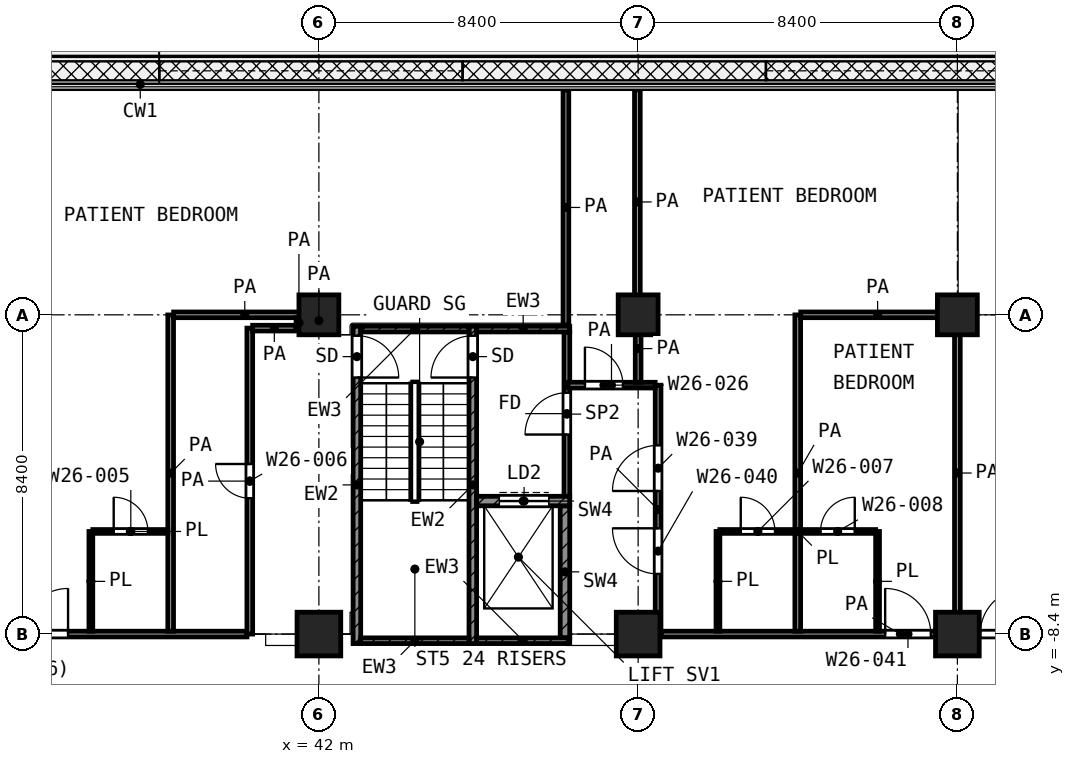
"""IFC4 building model, lengths in metres.
Left out: names, types, materials, properties, quantities, classifications, styles, units other than length and angle.
Written with IfcOpenShell. Run it as: python <this file> out.ifc"""

import sys

from ifc_helpers import new_model, si_unit, direction, frame, frame_2d, origin, origin_2d, place, context, subcontext, project, spatial, rectangle, extrude, element, fill, save


model = new_model("IFC4")
c1 = context("Model", 3, precision=1e-05, world=origin(), true_north=direction((0.0, 1.0)))
c2 = subcontext(c1, "Body", "Model", "MODEL_VIEW")
j1 = project(units=[si_unit("LENGTHUNIT", "METRE"), si_unit("PLANEANGLEUNIT", "RADIAN")], contexts=[c1])
p1 = place(None, origin())
s1 = spatial("IfcSite", under=j1, at=p1, CompositionType="ELEMENT")
p2 = place(p1, origin())
s2 = spatial("IfcBuilding", under=s1, at=p2, CompositionType="ELEMENT")
p3 = place(p2, frame((0.0, 0.0, 115.6)))
s3 = spatial("IfcBuildingStorey", under=s2, at=p3, CompositionType="ELEMENT", Elevation=115.6)
for number, where, z_axis, x_axis in (
    (1, (42.0, 0.0, 0.0), (0.0, 0.0, 1.0), (1.0, 0.0, 0.0)),
    (2, (50.4, 0.0, 0.0), (0.0, 0.0, 1.0), (1.0, 0.0, 0.0)),
    (3, (58.8, 0.0, 0.0), (0.0, 0.0, 1.0), (1.0, 0.0, 0.0)),
):
    element("IfcColumn", number, at=place(p3, frame(where, z_axis=z_axis, x_axis=x_axis)), inside=s3, PredefinedType="COLUMN", context=c2, shape_type="SweptSolid", body=[
        extrude(rectangle(XDim=1.05, YDim=1.05, at=origin_2d()), origin(), (0.0, 0.0, 1.0), 4.2),
    ])
for number, where, z_axis, x_axis in (
    (4, (42.0, -8.4, 0.0), (0.0, 0.0, 1.0), (1.0, 0.0, 0.0)),
    (5, (50.4, -8.4, 0.0), (0.0, 0.0, 1.0), (1.0, 0.0, 0.0)),
    (6, (58.8, -8.4, 0.0), (0.0, 0.0, 1.0), (1.0, 0.0, 0.0)),
):
    element("IfcColumn", number, at=place(p3, frame(where, z_axis=z_axis, x_axis=x_axis)), inside=s3, PredefinedType="COLUMN", context=c2, shape_type="SweptSolid", body=[
        extrude(rectangle(XDim=1.15, YDim=1.15, at=origin_2d()), origin(), (0.0, 0.0, 1.0), 4.2),
    ])
p4 = place(p3, frame((43.0, -8.65, 0.0), z_axis=(0.0, 0.0, 1.0), x_axis=(0.0, 1.0, 0.0)))
e7 = element("IfcWall", 7, at=p4, inside=s3, PredefinedType="SHEAR", context=c2, shape_type="SweptSolid", body=[
    extrude(rectangle(XDim=8.35, YDim=0.2, at=frame_2d((4.175, 0.0))), origin(), (0.0, 0.0, 1.0), 3.6),
])
p5 = place(p4, frame((7.0, 0.0, 0.0)))
e8 = element("IfcOpeningElement", 8, at=p5, cuts=e7, PredefinedType="OPENING", context=c2, shape_type="SweptSolid", body=[
    extrude(rectangle(XDim=1.1, YDim=2.1, at=frame_2d((0.55, 1.05))), frame((0.0, 0.11, 0.0), z_axis=(0.0, -1.0, 0.0), x_axis=(1.0, 0.0, 0.0)), (0.0, 0.0, 1.0), 0.22),
])
p6 = place(p3, frame((46.05, -8.65, 0.0), z_axis=(0.0, 0.0, 1.0), x_axis=(0.0, 1.0, 0.0)))
e9 = element("IfcWall", 9, at=p6, inside=s3, PredefinedType="SHEAR", context=c2, shape_type="SweptSolid", body=[
    extrude(rectangle(XDim=8.35, YDim=0.2, at=frame_2d((4.175, 0.0))), origin(), (0.0, 0.0, 1.0), 3.6),
])
p7 = place(p6, frame((7.0, 0.0, 0.0)))
e10 = element("IfcOpeningElement", 10, at=p7, cuts=e9, PredefinedType="OPENING", context=c2, shape_type="SweptSolid", body=[
    extrude(rectangle(XDim=1.1, YDim=2.1, at=frame_2d((0.55, 1.05))), frame((0.0, 0.11, 0.0), z_axis=(0.0, -1.0, 0.0), x_axis=(1.0, 0.0, 0.0)), (0.0, 0.0, 1.0), 0.22),
])
p8 = place(p3, frame((43.1, -0.375, 0.0), z_axis=(0.0, 0.0, 1.0), x_axis=(1.0, 0.0, 0.0)))
e11 = element("IfcWall", 11, at=p8, inside=s3, PredefinedType="SHEAR", context=c2, shape_type="SweptSolid", body=[
    extrude(rectangle(XDim=2.85, YDim=0.15, at=frame_2d((1.425, 0.0))), origin(), (0.0, 0.0, 1.0), 3.6),
])
p9 = place(p3, frame((46.15, -0.375, 0.0), z_axis=(0.0, 0.0, 1.0), x_axis=(1.0, 0.0, 0.0)))
e12 = element("IfcWall", 12, at=p9, inside=s3, PredefinedType="SHEAR", context=c2, shape_type="SweptSolid", body=[
    extrude(rectangle(XDim=2.45, YDim=0.15, at=frame_2d((1.225, 0.0))), origin(), (0.0, 0.0, 1.0), 3.6),
])
p10 = place(p3, frame((43.1, -8.575, 0.0), z_axis=(0.0, 0.0, 1.0), x_axis=(1.0, 0.0, 0.0)))
e13 = element("IfcWall", 13, at=p10, inside=s3, PredefinedType="SHEAR", context=c2, shape_type="SweptSolid", body=[
    extrude(rectangle(XDim=2.85, YDim=0.15, at=frame_2d((1.425, 0.0))), origin(), (0.0, 0.0, 1.0), 3.6),
])
p11 = place(p3, frame((46.15, -8.575, 0.0), z_axis=(0.0, 0.0, 1.0), x_axis=(1.0, 0.0, 0.0)))
e14 = element("IfcWall", 14, at=p11, inside=s3, PredefinedType="SHEAR", context=c2, shape_type="SweptSolid", body=[
    extrude(rectangle(XDim=2.45, YDim=0.15, at=frame_2d((1.225, 0.0))), origin(), (0.0, 0.0, 1.0), 3.6),
])
p12 = place(p3, frame((46.15, -4.9, 0.0), z_axis=(0.0, 0.0, 1.0), x_axis=(1.0, 0.0, 0.0)))
e15 = element("IfcWall", 15, at=p12, inside=s3, PredefinedType="SHEAR", context=c2, shape_type="SweptSolid", body=[
    extrude(rectangle(XDim=2.45, YDim=0.25, at=frame_2d((1.225, 0.0))), origin(), (0.0, 0.0, 1.0), 3.6),
])
p13 = place(p12, frame((0.6, 0.0, 0.0)))
e16 = element("IfcOpeningElement", 16, at=p13, cuts=e15, PredefinedType="OPENING", context=c2, shape_type="SweptSolid", body=[
    extrude(rectangle(XDim=1.3, YDim=2.1, at=frame_2d((0.65, 1.05))), frame((0.0, 0.135, 0.0), z_axis=(0.0, -1.0, 0.0), x_axis=(1.0, 0.0, 0.0)), (0.0, 0.0, 1.0), 0.27),
])
p14 = place(p3, frame((48.475, -8.5, 0.0), z_axis=(0.0, 0.0, 1.0), x_axis=(0.0, 1.0, 0.0)))
e17 = element("IfcWall", 17, at=p14, inside=s3, PredefinedType="SHEAR", context=c2, shape_type="SweptSolid", body=[
    extrude(rectangle(XDim=3.475, YDim=0.25, at=frame_2d((1.738, 0.0))), origin(), (0.0, 0.0, 1.0), 3.6),
])
p15 = place(p3, frame((48.525, -4.775, 0.0), z_axis=(0.0, 0.0, 1.0), x_axis=(0.0, 1.0, 0.0)))
e18 = element("IfcWall", 18, at=p15, inside=s3, PredefinedType="PARTITIONING", context=c2, shape_type="SweptSolid", body=[
    extrude(rectangle(XDim=4.325, YDim=0.15, at=frame_2d((2.163, 0.0))), origin(), (0.0, 0.0, 1.0), 3.6),
])
p16 = place(p15, frame((1.625, 0.0, 0.0)))
e19 = element("IfcOpeningElement", 19, at=p16, cuts=e18, PredefinedType="OPENING", context=c2, shape_type="SweptSolid", body=[
    extrude(rectangle(XDim=1.1, YDim=2.1, at=frame_2d((0.55, 1.05))), frame((0.0, 0.085, 0.0), z_axis=(0.0, -1.0, 0.0), x_axis=(1.0, 0.0, 0.0)), (0.0, 0.0, 1.0), 0.17),
])
p17 = place(p3, frame((36.052, -5.7, 0.0), z_axis=(0.0, 0.0, 1.0), x_axis=(1.0, 0.0, 0.0)))
e20 = element("IfcWall", 20, at=p17, inside=s3, PredefinedType="PARTITIONING", context=c2, shape_type="SweptSolid", body=[
    extrude(rectangle(XDim=1.973, YDim=0.1, at=frame_2d((0.986, 0.0))), origin(), (0.0, 0.0, 1.0), 3.6),
])
p18 = place(p17, frame((0.549, 0.0, 0.0)))
e21 = element("IfcOpeningElement", 21, at=p18, cuts=e20, PredefinedType="OPENING", context=c2, shape_type="SweptSolid", body=[
    extrude(rectangle(XDim=0.9, YDim=2.1, at=frame_2d((0.45, 1.05))), frame((0.0, 0.06, 0.0), z_axis=(0.0, -1.0, 0.0), x_axis=(1.0, 0.0, 0.0)), (0.0, 0.0, 1.0), 0.12),
])
p19 = place(p3, frame((52.55, -5.7, 0.0), z_axis=(0.0, 0.0, 1.0), x_axis=(1.0, 0.0, 0.0)))
e22 = element("IfcWall", 22, at=p19, inside=s3, PredefinedType="PARTITIONING", context=c2, shape_type="SweptSolid", body=[
    extrude(rectangle(XDim=4.1, YDim=0.1, at=frame_2d((2.05, 0.0))), origin(), (0.0, 0.0, 1.0), 3.6),
])
p20 = place(p19, frame((0.55, 0.0, 0.0)))
e23 = element("IfcOpeningElement", 23, at=p20, cuts=e22, PredefinedType="OPENING", context=c2, shape_type="SweptSolid", body=[
    extrude(rectangle(XDim=0.9, YDim=2.1, at=frame_2d((0.45, 1.05))), frame((0.0, 0.06, 0.0), z_axis=(0.0, -1.0, 0.0), x_axis=(1.0, 0.0, 0.0)), (0.0, 0.0, 1.0), 0.12),
])
p21 = place(p19, frame((2.65, 0.0, 0.0)))
e24 = element("IfcOpeningElement", 24, at=p21, cuts=e22, PredefinedType="OPENING", context=c2, shape_type="SweptSolid", body=[
    extrude(rectangle(XDim=0.9, YDim=2.1, at=frame_2d((0.45, 1.05))), frame((0.0, 0.06, 0.0), z_axis=(0.0, -1.0, 0.0), x_axis=(1.0, 0.0, 0.0)), (0.0, 0.0, 1.0), 0.12),
])
p22 = place(p3, frame((36.0, -8.325, 0.0), z_axis=(0.0, 0.0, 1.0), x_axis=(0.0, 1.0, 0.0)))
e25 = element("IfcWall", 25, at=p22, inside=s3, PredefinedType="PARTITIONING", context=c2, shape_type="SweptSolid", body=[
    extrude(rectangle(XDim=2.624, YDim=0.1, at=frame_2d((1.312, 0.0))), origin(), (0.0, 0.0, 1.0), 3.6),
])
for number, where, z_axis, x_axis in (
    (26, (52.5, -8.325, 0.0), (0.0, 0.0, 1.0), (0.0, 1.0, 0.0)),
    (27, (56.7, -8.325, 0.0), (0.0, 0.0, 1.0), (0.0, 1.0, 0.0)),
):
    element("IfcWall", number, at=place(p3, frame(where, z_axis=z_axis, x_axis=x_axis)), inside=s3, PredefinedType="PARTITIONING", context=c2, shape_type="SweptSolid", body=[
        extrude(rectangle(XDim=2.625, YDim=0.1, at=frame_2d((1.312, 0.0))), origin(), (0.0, 0.0, 1.0), 3.6),
    ])
p23 = place(p3, frame((25.0, -8.4, 0.0), z_axis=(0.0, 0.0, 1.0), x_axis=(1.0, 0.0, 0.0)))
e28 = element("IfcWall", 28, at=p23, inside=s3, PredefinedType="PARTITIONING", context=c2, shape_type="SweptSolid", body=[
    extrude(rectangle(XDim=15.107, YDim=0.15, at=frame_2d((7.553, 0.0))), origin(), (0.0, 0.0, 1.0), 3.6),
])
p24 = place(p23, frame((3.65, 0.0, 0.0)))
e29 = element("IfcOpeningElement", 29, at=p24, cuts=e28, PredefinedType="OPENING", context=c2, shape_type="SweptSolid", body=[
    extrude(rectangle(XDim=1.5, YDim=2.1, at=frame_2d((0.75, 1.05))), frame((0.0, 0.085, 0.0), z_axis=(0.0, -1.0, 0.0), x_axis=(1.0, 0.0, 0.0)), (0.0, 0.0, 1.0), 0.17),
])
p25 = place(p23, frame((9.2, 0.0, 0.0)))
e30 = element("IfcOpeningElement", 30, at=p25, cuts=e28, PredefinedType="OPENING", context=c2, shape_type="SweptSolid", body=[
    extrude(rectangle(XDim=1.2, YDim=2.1, at=frame_2d((0.6, 1.05))), frame((0.0, 0.085, 0.0), z_axis=(0.0, -1.0, 0.0), x_axis=(1.0, 0.0, 0.0)), (0.0, 0.0, 1.0), 0.17),
])
p26 = place(p3, frame((51.0, -8.4, 0.0), z_axis=(0.0, 0.0, 1.0), x_axis=(1.0, 0.0, 0.0)))
e31 = element("IfcWall", 31, at=p26, inside=s3, PredefinedType="PARTITIONING", context=c2, shape_type="SweptSolid", body=[
    extrude(rectangle(XDim=12.6, YDim=0.15, at=frame_2d((6.3, 0.0))), origin(), (0.0, 0.0, 1.0), 3.6),
])
p27 = place(p26, frame((5.9, 0.0, 0.0)))
e32 = element("IfcOpeningElement", 32, at=p27, cuts=e31, PredefinedType="OPENING", context=c2, shape_type="SweptSolid", body=[
    extrude(rectangle(XDim=1.2, YDim=2.1, at=frame_2d((0.6, 1.05))), frame((0.0, 0.085, 0.0), z_axis=(0.0, -1.0, 0.0), x_axis=(1.0, 0.0, 0.0)), (0.0, 0.0, 1.0), 0.17),
])
p28 = place(p26, frame((8.4, 0.0, 0.0)))
e33 = element("IfcOpeningElement", 33, at=p28, cuts=e31, PredefinedType="OPENING", context=c2, shape_type="SweptSolid", body=[
    extrude(rectangle(XDim=1.2, YDim=2.1, at=frame_2d((0.6, 1.05))), frame((0.0, 0.085, 0.0), z_axis=(0.0, -1.0, 0.0), x_axis=(1.0, 0.0, 0.0)), (0.0, 0.0, 1.0), 0.17),
])
p29 = place(p3, frame((48.55, -1.85, 0.0), z_axis=(0.0, 0.0, 1.0), x_axis=(1.0, 0.0, 0.0)))
e34 = element("IfcWall", 34, at=p29, inside=s3, PredefinedType="PARTITIONING", context=c2, shape_type="SweptSolid", body=[
    extrude(rectangle(XDim=2.298, YDim=0.15, at=frame_2d((1.149, 0.0))), origin(), (0.0, 0.0, 1.0), 3.6),
])
p30 = place(p29, frame((0.45, 0.0, 0.0)))
e35 = element("IfcOpeningElement", 35, at=p30, cuts=e34, PredefinedType="OPENING", context=c2, shape_type="SweptSolid", body=[
    extrude(rectangle(XDim=1.0, YDim=2.1, at=frame_2d((0.5, 1.05))), frame((0.0, 0.085, 0.0), z_axis=(0.0, -1.0, 0.0), x_axis=(1.0, 0.0, 0.0)), (0.0, 0.0, 1.0), 0.17),
])
p31 = place(p3, frame((40.257, -0.35, 0.0), z_axis=(0.0, 0.0, 1.0), x_axis=(1.0, 0.0, 0.0)))
e36 = element("IfcWall", 36, at=p31, inside=s3, PredefinedType="PARTITIONING", context=c2, shape_type="SweptSolid", body=[
    extrude(rectangle(XDim=1.141, YDim=0.15, at=frame_2d((0.57, 0.0))), origin(), (0.0, 0.0, 1.0), 3.6),
])
p32 = place(p3, frame((38.178, 0.0, 0.0), z_axis=(0.0, 0.0, 1.0), x_axis=(1.0, 0.0, 0.0)))
e37 = element("IfcWall", 37, at=p32, inside=s3, PredefinedType="PARTITIONING", context=c2, shape_type="SweptSolid", body=[
    extrude(rectangle(XDim=3.744, YDim=0.15, at=frame_2d((1.872, 0.0))), origin(), (0.0, 0.0, 1.0), 3.6),
])
p33 = place(p3, frame((54.678, 0.0, 0.0), z_axis=(0.0, 0.0, 1.0), x_axis=(1.0, 0.0, 0.0)))
e38 = element("IfcWall", 38, at=p33, inside=s3, PredefinedType="PARTITIONING", context=c2, shape_type="SweptSolid", body=[
    extrude(rectangle(XDim=4.047, YDim=0.15, at=frame_2d((2.023, 0.0))), origin(), (0.0, 0.0, 1.0), 3.6),
])
p34 = place(p3, frame((38.1, -8.325, 0.0), z_axis=(0.0, 0.0, 1.0), x_axis=(0.0, 1.0, 0.0)))
e39 = element("IfcWall", 39, at=p34, inside=s3, PredefinedType="PARTITIONING", context=c2, shape_type="SweptSolid", body=[
    extrude(rectangle(XDim=8.322, YDim=0.15, at=frame_2d((4.161, 0.0))), origin(), (0.0, 0.0, 1.0), 3.6),
])
p35 = place(p3, frame((40.182, -8.4, 0.0), z_axis=(0.0, 0.0, 1.0), x_axis=(0.0, 1.0, 0.0)))
e40 = element("IfcWall", 40, at=p35, inside=s3, PredefinedType="PARTITIONING", context=c2, shape_type="SweptSolid", body=[
    extrude(rectangle(XDim=8.05, YDim=0.15, at=frame_2d((4.025, 0.0))), origin(), (0.0, 0.0, 1.0), 3.6),
])
p36 = place(p35, frame((3.575, 0.0, 0.0)))
e41 = element("IfcOpeningElement", 41, at=p36, cuts=e40, PredefinedType="OPENING", context=c2, shape_type="SweptSolid", body=[
    extrude(rectangle(XDim=0.9, YDim=2.1, at=frame_2d((0.45, 1.05))), frame((0.0, 0.085, 0.0), z_axis=(0.0, -1.0, 0.0), x_axis=(1.0, 0.0, 0.0)), (0.0, 0.0, 1.0), 0.17),
])
p37 = place(p3, frame((41.475, -0.348, 0.0), z_axis=(0.0, 0.0, 1.0), x_axis=(0.0, 1.0, 0.0)))
e42 = element("IfcWall", 42, at=p37, inside=s3, PredefinedType="PARTITIONING", context=c2, shape_type="SweptSolid", body=[
    extrude(rectangle(XDim=0.273, YDim=0.15, at=frame_2d((0.136, 0.0))), origin(), (0.0, 0.0, 1.0), 3.6),
])
p38 = place(p3, frame((42.0, -0.3, 0.0), z_axis=(0.0, 0.0, 1.0), x_axis=(0.0, 1.0, 0.0)))
e43 = element("IfcWall", 43, at=p38, inside=s3, PredefinedType="PARTITIONING", context=c2, shape_type="SweptSolid", body=[
    extrude(rectangle(XDim=0.297, YDim=0.15, at=frame_2d((0.148, 0.0))), origin(), (0.0, 0.0, 1.0), 3.6),
])
p39 = place(p3, frame((48.5, -0.27, 0.0), z_axis=(0.0, 0.0, 1.0), x_axis=(0.0, 1.0, 0.0)))
e44 = element("IfcWall", 44, at=p39, inside=s3, PredefinedType="PARTITIONING", context=c2, shape_type="SweptSolid", body=[
    extrude(rectangle(XDim=6.19, YDim=0.15, at=frame_2d((3.095, 0.0))), origin(), (0.0, 0.0, 1.0), 3.6),
])
p40 = place(p3, frame((50.38, 0.02, 0.0), z_axis=(0.0, 0.0, 1.0), x_axis=(0.0, 1.0, 0.0)))
e45 = element("IfcWall", 45, at=p40, inside=s3, PredefinedType="PARTITIONING", context=c2, shape_type="SweptSolid", body=[
    extrude(rectangle(XDim=5.9, YDim=0.15, at=frame_2d((2.95, 0.0))), origin(), (0.0, 0.0, 1.0), 3.6),
])
p41 = place(p3, frame((50.4, -1.775, 0.0), z_axis=(0.0, 0.0, 1.0), x_axis=(0.0, 1.0, 0.0)))
e46 = element("IfcWall", 46, at=p41, inside=s3, PredefinedType="PARTITIONING", context=c2, shape_type="SweptSolid", body=[
    extrude(rectangle(XDim=1.773, YDim=0.15, at=frame_2d((0.886, 0.0))), origin(), (0.0, 0.0, 1.0), 3.6),
])
p42 = place(p3, frame((50.925, -8.4, 0.0), z_axis=(0.0, 0.0, 1.0), x_axis=(0.0, 1.0, 0.0)))
e47 = element("IfcWall", 47, at=p42, inside=s3, PredefinedType="PARTITIONING", context=c2, shape_type="SweptSolid", body=[
    extrude(rectangle(XDim=6.548, YDim=0.15, at=frame_2d((3.274, 0.0))), origin(), (0.0, 0.0, 1.0), 3.6),
])
p43 = place(p42, frame((3.765, 0.0, 0.0)))
e48 = element("IfcOpeningElement", 48, at=p43, cuts=e47, PredefinedType="OPENING", context=c2, shape_type="SweptSolid", body=[
    extrude(rectangle(XDim=1.2, YDim=2.1, at=frame_2d((0.6, 1.05))), frame((0.0, 0.085, 0.0), z_axis=(0.0, -1.0, 0.0), x_axis=(1.0, 0.0, 0.0)), (0.0, 0.0, 1.0), 0.17),
])
p44 = place(p42, frame((1.583, 0.0, 0.0)))
e49 = element("IfcOpeningElement", 49, at=p44, cuts=e47, PredefinedType="OPENING", context=c2, shape_type="SweptSolid", body=[
    extrude(rectangle(XDim=1.2, YDim=2.1, at=frame_2d((0.6, 1.05))), frame((0.0, 0.085, 0.0), z_axis=(0.0, -1.0, 0.0), x_axis=(1.0, 0.0, 0.0)), (0.0, 0.0, 1.0), 0.17),
])
p45 = place(p3, frame((54.6, -8.325, 0.0), z_axis=(0.0, 0.0, 1.0), x_axis=(0.0, 1.0, 0.0)))
e50 = element("IfcWall", 50, at=p45, inside=s3, PredefinedType="PARTITIONING", context=c2, shape_type="SweptSolid", body=[
    extrude(rectangle(XDim=8.323, YDim=0.15, at=frame_2d((4.162, 0.0))), origin(), (0.0, 0.0, 1.0), 3.6),
])
p46 = place(p3, frame((58.8, -8.325, 0.0), z_axis=(0.0, 0.0, 1.0), x_axis=(0.0, 1.0, 0.0)))
e51 = element("IfcWall", 51, at=p46, inside=s3, PredefinedType="PARTITIONING", context=c2, shape_type="SweptSolid", body=[
    extrude(rectangle(XDim=8.325, YDim=0.15, at=frame_2d((4.163, 0.0))), origin(), (0.0, 0.0, 1.0), 3.6),
])
p47 = place(p5, frame((1.1, 0.0, 0.0), z_axis=(0.0, 0.0, 1.0), x_axis=(-1.0, 0.0, 0.0)))
e52 = element("IfcDoor", 52, at=p47, inside=s3, OperationType="SINGLE_SWING_LEFT", PredefinedType="DOOR", context=c2, shape_type="SweptSolid", body=[
    extrude(rectangle(XDim=1.1, YDim=2.1, at=frame_2d((0.55, 1.05))), frame((0.0, 0.025, 0.0), z_axis=(0.0, -1.0, 0.0), x_axis=(1.0, 0.0, 0.0)), (0.0, 0.0, 1.0), 0.05),
])
fill(e8, e52)
p48 = place(p7, origin())
e53 = element("IfcDoor", 53, at=p48, inside=s3, OperationType="SINGLE_SWING_LEFT", PredefinedType="DOOR", context=c2, shape_type="SweptSolid", body=[
    extrude(rectangle(XDim=1.1, YDim=2.1, at=frame_2d((0.55, 1.05))), frame((0.0, 0.025, 0.0), z_axis=(0.0, -1.0, 0.0), x_axis=(1.0, 0.0, 0.0)), (0.0, 0.0, 1.0), 0.05),
])
fill(e10, e53)
p49 = place(p13, origin())
e54 = element("IfcDoor", 54, at=p49, inside=s3, OperationType="DOUBLE_DOOR_SLIDING", PredefinedType="DOOR", context=c2, shape_type="SweptSolid", body=[
    extrude(rectangle(XDim=1.3, YDim=2.1, at=frame_2d((0.65, 1.05))), frame((0.0, 0.025, 0.0), z_axis=(0.0, -1.0, 0.0), x_axis=(1.0, 0.0, 0.0)), (0.0, 0.0, 1.0), 0.05),
])
fill(e16, e54)
p50 = place(p16, origin())
e55 = element("IfcDoor", 55, at=p50, inside=s3, OperationType="SINGLE_SWING_LEFT", PredefinedType="DOOR", context=c2, shape_type="SweptSolid", body=[
    extrude(rectangle(XDim=1.1, YDim=2.1, at=frame_2d((0.55, 1.05))), frame((0.0, 0.025, 0.0), z_axis=(0.0, -1.0, 0.0), x_axis=(1.0, 0.0, 0.0)), (0.0, 0.0, 1.0), 0.05),
])
fill(e19, e55)
p51 = place(p25, origin())
e56 = element("IfcDoor", 56, at=p51, inside=s3, OperationType="SINGLE_SWING_RIGHT", PredefinedType="DOOR", context=c2, shape_type="SweptSolid", body=[
    extrude(rectangle(XDim=1.2, YDim=2.1, at=frame_2d((0.6, 1.05))), frame((0.0, 0.025, 0.0), z_axis=(0.0, -1.0, 0.0), x_axis=(1.0, 0.0, 0.0)), (0.0, 0.0, 1.0), 0.05),
])
fill(e30, e56)
p52 = place(p18, origin())
e57 = element("IfcDoor", 57, at=p52, inside=s3, OperationType="SINGLE_SWING_LEFT", PredefinedType="DOOR", context=c2, shape_type="SweptSolid", body=[
    extrude(rectangle(XDim=0.9, YDim=2.1, at=frame_2d((0.45, 1.05))), frame((0.0, 0.025, 0.0), z_axis=(0.0, -1.0, 0.0), x_axis=(1.0, 0.0, 0.0)), (0.0, 0.0, 1.0), 0.05),
])
fill(e21, e57)
p53 = place(p36, origin())
e58 = element("IfcDoor", 58, at=p53, inside=s3, OperationType="SINGLE_SWING_RIGHT", PredefinedType="DOOR", context=c2, shape_type="SweptSolid", body=[
    extrude(rectangle(XDim=0.9, YDim=2.1, at=frame_2d((0.45, 1.05))), frame((0.0, 0.025, 0.0), z_axis=(0.0, -1.0, 0.0), x_axis=(1.0, 0.0, 0.0)), (0.0, 0.0, 1.0), 0.05),
])
fill(e41, e58)
p54 = place(p30, origin())
e59 = element("IfcDoor", 59, at=p54, inside=s3, OperationType="SINGLE_SWING_LEFT", PredefinedType="DOOR", context=c2, shape_type="SweptSolid", body=[
    extrude(rectangle(XDim=1.0, YDim=2.1, at=frame_2d((0.5, 1.05))), frame((0.0, 0.025, 0.0), z_axis=(0.0, -1.0, 0.0), x_axis=(1.0, 0.0, 0.0)), (0.0, 0.0, 1.0), 0.05),
])
fill(e35, e59)
p55 = place(p43, origin())
e60 = element("IfcDoor", 60, at=p55, inside=s3, OperationType="SINGLE_SWING_LEFT", PredefinedType="DOOR", context=c2, shape_type="SweptSolid", body=[
    extrude(rectangle(XDim=1.2, YDim=2.1, at=frame_2d((0.6, 1.05))), frame((0.0, 0.025, 0.0), z_axis=(0.0, -1.0, 0.0), x_axis=(1.0, 0.0, 0.0)), (0.0, 0.0, 1.0), 0.05),
])
fill(e48, e60)
p56 = place(p44, origin())
e61 = element("IfcDoor", 61, at=p56, inside=s3, OperationType="SINGLE_SWING_RIGHT", PredefinedType="DOOR", context=c2, shape_type="SweptSolid", body=[
    extrude(rectangle(XDim=1.2, YDim=2.1, at=frame_2d((0.6, 1.05))), frame((0.0, 0.025, 0.0), z_axis=(0.0, -1.0, 0.0), x_axis=(1.0, 0.0, 0.0)), (0.0, 0.0, 1.0), 0.05),
])
fill(e49, e61)
p57 = place(p20, origin())
e62 = element("IfcDoor", 62, at=p57, inside=s3, OperationType="SINGLE_SWING_LEFT", PredefinedType="DOOR", context=c2, shape_type="SweptSolid", body=[
    extrude(rectangle(XDim=0.9, YDim=2.1, at=frame_2d((0.45, 1.05))), frame((0.0, 0.025, 0.0), z_axis=(0.0, -1.0, 0.0), x_axis=(1.0, 0.0, 0.0)), (0.0, 0.0, 1.0), 0.05),
])
fill(e23, e62)
p58 = place(p27, origin())
e63 = element("IfcDoor", 63, at=p58, inside=s3, OperationType="SINGLE_SWING_LEFT", PredefinedType="DOOR", context=c2, shape_type="SweptSolid", body=[
    extrude(rectangle(XDim=1.2, YDim=2.1, at=frame_2d((0.6, 1.05))), frame((0.0, 0.025, 0.0), z_axis=(0.0, -1.0, 0.0), x_axis=(1.0, 0.0, 0.0)), (0.0, 0.0, 1.0), 0.05),
])
fill(e32, e63)
p59 = place(p21, origin())
e64 = element("IfcDoor", 64, at=p59, inside=s3, OperationType="SINGLE_SWING_RIGHT", PredefinedType="DOOR", context=c2, shape_type="SweptSolid", body=[
    extrude(rectangle(XDim=0.9, YDim=2.1, at=frame_2d((0.45, 1.05))), frame((0.0, 0.025, 0.0), z_axis=(0.0, -1.0, 0.0), x_axis=(1.0, 0.0, 0.0)), (0.0, 0.0, 1.0), 0.05),
])
fill(e24, e64)
p60 = place(p28, origin())
e65 = element("IfcDoor", 65, at=p60, inside=s3, OperationType="SINGLE_SWING_RIGHT", PredefinedType="DOOR", context=c2, shape_type="SweptSolid", body=[
    extrude(rectangle(XDim=1.2, YDim=2.1, at=frame_2d((0.6, 1.05))), frame((0.0, 0.025, 0.0), z_axis=(0.0, -1.0, 0.0), x_axis=(1.0, 0.0, 0.0)), (0.0, 0.0, 1.0), 0.05),
])
fill(e33, e65)
save(model, sys.argv[1])
